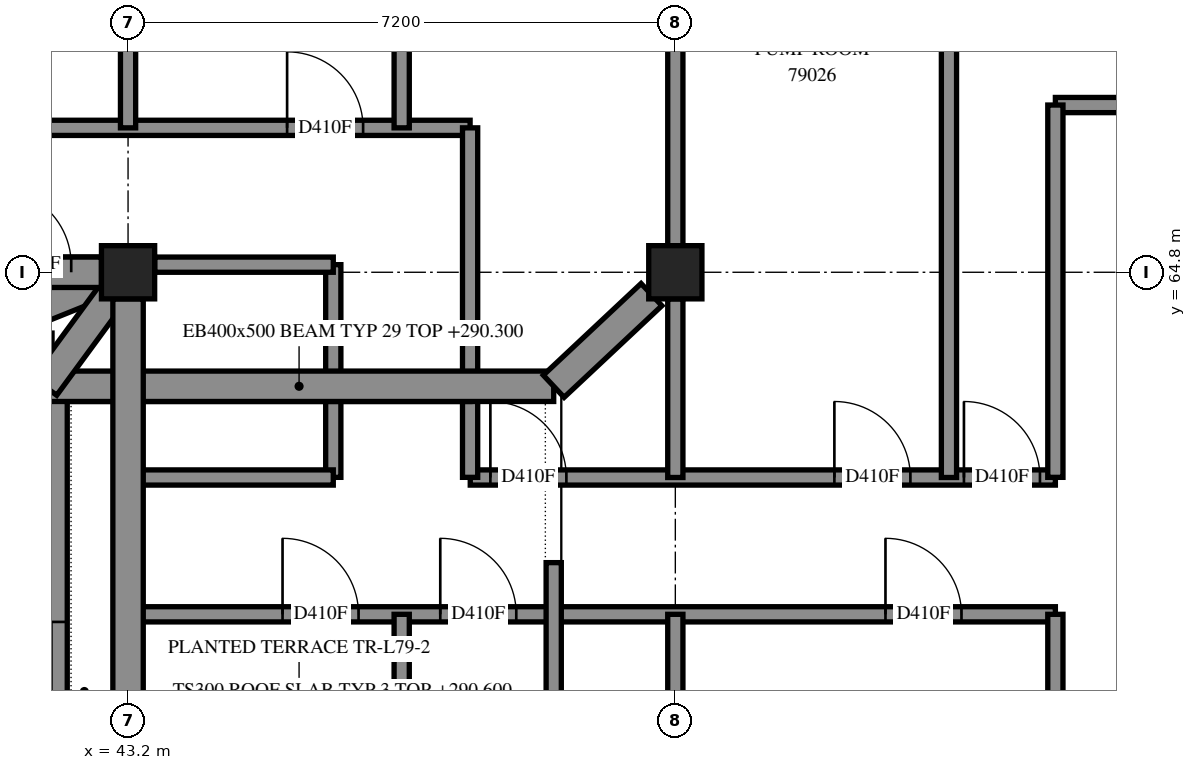
"""IFC4 building model, lengths in metres.
Left out: names, types, materials, properties, quantities, classifications, styles, units other than length and angle.
Written with IfcOpenShell. Run it as: python <this file> out.ifc"""

import sys

from ifc_helpers import new_model, si_unit, direction, frame, frame_2d, origin, origin_2d, place, context, subcontext, project, spatial, polyline, rectangle, outline, extrude, element, fill, save


model = new_model("IFC4")
c1 = context("Model", 3, precision=1e-05, world=origin(), true_north=direction((0.0, 1.0)))
c2 = subcontext(c1, "Body", "Model", "MODEL_VIEW")
j1 = project(units=[si_unit("LENGTHUNIT", "METRE"), si_unit("PLANEANGLEUNIT", "RADIAN")], contexts=[c1])
p1 = place(None, origin())
s1 = spatial("IfcSite", under=j1, at=p1, CompositionType="ELEMENT")
p2 = place(p1, origin())
s2 = spatial("IfcBuilding", under=s1, at=p2, CompositionType="ELEMENT")
p3 = place(p2, frame((0.0, 0.0, 290.6)))
s3 = spatial("IfcBuildingStorey", under=s2, at=p3, CompositionType="ELEMENT", Elevation=290.6)
for number, where, z_axis, x_axis in (
    (1, (43.2, 64.8, 0.0), (0.0, 0.0, 1.0), (1.0, 0.0, 0.0)),
    (2, (50.4, 64.8, 0.0), (0.0, 0.0, 1.0), (1.0, 0.0, 0.0)),
):
    element("IfcColumn", number, at=place(p3, frame(where, z_axis=z_axis, x_axis=x_axis)), inside=s3, PredefinedType="COLUMN", context=c2, shape_type="SweptSolid", body=[
        extrude(rectangle(XDim=0.7, YDim=0.7, at=origin_2d()), origin(), (0.0, 0.0, 1.0), 3.5),
    ])
p4 = place(p3, frame((33.767, 63.8, 0.0), z_axis=(0.0, 0.0, 1.0), x_axis=(1.0, 0.0, 0.0)))
e3 = element("IfcWall", 3, at=p4, inside=s3, PredefinedType="SOLIDWALL", context=c2, shape_type="SweptSolid", body=[
    extrude(outline(polyline([(-0.2, -0.2), (8.233, -0.2), (8.633, 0.2), (0.2, 0.2), (-0.2, -0.2)])), origin(), (0.0, 0.0, 1.0), 3.5),
])
p5 = place(p4, frame((3.283, 0.0, 0.7)))
e4 = element("IfcOpeningElement", 4, at=p5, cuts=e3, PredefinedType="OPENING", context=c2, shape_type="SweptSolid", body=[
    extrude(rectangle(XDim=1.8, YDim=2.2, at=frame_2d((0.9, 1.1))), frame((0.0, 0.21, 0.0), z_axis=(0.0, -1.0, 0.0), x_axis=(1.0, 0.0, 0.0)), (0.0, 0.0, 1.0), 0.42),
])
p6 = place(p4, frame((6.133, 0.0, 0.7)))
e5 = element("IfcOpeningElement", 5, at=p6, cuts=e3, PredefinedType="OPENING", context=c2, shape_type="SweptSolid", body=[
    extrude(rectangle(XDim=1.8, YDim=2.2, at=frame_2d((0.9, 1.1))), frame((0.0, 0.21, 0.0), z_axis=(0.0, -1.0, 0.0), x_axis=(1.0, 0.0, 0.0)), (0.0, 0.0, 1.0), 0.42),
])
p7 = place(p3, frame((42.2, 63.8, 0.0), z_axis=(0.0, 0.0, 1.0), x_axis=(0.0, -1.0, 0.0)))
e6 = element("IfcWall", 6, at=p7, inside=s3, PredefinedType="SOLIDWALL", context=c2, shape_type="SweptSolid", body=[
    extrude(outline(polyline([(0.2, -0.2), (7.4, -0.2), (7.0, 0.2), (-0.2, 0.2), (0.2, -0.2)])), origin(), (0.0, 0.0, 1.0), 3.5),
])
p8 = place(p7, frame((3.6, 0.0, 0.7)))
e7 = element("IfcOpeningElement", 7, at=p8, cuts=e6, PredefinedType="OPENING", context=c2, shape_type="SweptSolid", body=[
    extrude(rectangle(XDim=1.8, YDim=2.2, at=frame_2d((0.9, 1.1))), frame((0.0, 0.21, 0.0), z_axis=(0.0, -1.0, 0.0), x_axis=(1.0, 0.0, 0.0)), (0.0, 0.0, 1.0), 0.42),
])
p9 = place(p3, frame((55.4, 67.0, 0.0), z_axis=(0.0, 0.0, 1.0), x_axis=(1.0, 0.0, 0.0)))
e8 = element("IfcWall", 8, at=p9, inside=s3, PredefinedType="PARTITIONING", context=c2, shape_type="SweptSolid", body=[
    extrude(rectangle(XDim=18.8, YDim=0.2, at=frame_2d((9.4, 0.0))), origin(), (0.0, 0.0, 1.0), 3.5),
])
p10 = place(p9, frame((4.293, 0.0, 0.0)))
e9 = element("IfcOpeningElement", 9, at=p10, cuts=e8, PredefinedType="OPENING", context=c2, shape_type="SweptSolid", body=[
    extrude(rectangle(XDim=1.0, YDim=2.1, at=frame_2d((0.5, 1.05))), frame((0.0, 0.11, 0.0), z_axis=(0.0, -1.0, 0.0), x_axis=(1.0, 0.0, 0.0)), (0.0, 0.0, 1.0), 0.22),
])
p11 = place(p9, frame((6.367, 0.0, 0.0)))
e10 = element("IfcOpeningElement", 10, at=p11, cuts=e8, PredefinedType="OPENING", context=c2, shape_type="SweptSolid", body=[
    extrude(rectangle(XDim=1.0, YDim=2.1, at=frame_2d((0.5, 1.05))), frame((0.0, 0.11, 0.0), z_axis=(0.0, -1.0, 0.0), x_axis=(1.0, 0.0, 0.0)), (0.0, 0.0, 1.0), 0.22),
])
p12 = place(p9, frame((11.492, 0.0, 0.0)))
e11 = element("IfcOpeningElement", 11, at=p12, cuts=e8, PredefinedType="OPENING", context=c2, shape_type="SweptSolid", body=[
    extrude(rectangle(XDim=1.0, YDim=2.1, at=frame_2d((0.5, 1.05))), frame((0.0, 0.11, 0.0), z_axis=(0.0, -1.0, 0.0), x_axis=(1.0, 0.0, 0.0)), (0.0, 0.0, 1.0), 0.22),
])
p13 = place(p9, frame((13.568, 0.0, 0.0)))
e12 = element("IfcOpeningElement", 12, at=p13, cuts=e8, PredefinedType="OPENING", context=c2, shape_type="SweptSolid", body=[
    extrude(rectangle(XDim=1.0, YDim=2.1, at=frame_2d((0.5, 1.05))), frame((0.0, 0.11, 0.0), z_axis=(0.0, -1.0, 0.0), x_axis=(1.0, 0.0, 0.0)), (0.0, 0.0, 1.0), 0.22),
])
p14 = place(p3, frame((43.2, 60.3, 0.0), z_axis=(0.0, 0.0, 1.0), x_axis=(1.0, 0.0, 0.0)))
e13 = element("IfcWall", 13, at=p14, inside=s3, PredefinedType="PARTITIONING", context=c2, shape_type="SweptSolid", body=[
    extrude(rectangle(XDim=12.2, YDim=0.2, at=frame_2d((6.1, 0.0))), origin(), (0.0, 0.0, 1.0), 3.5),
])
p15 = place(p14, frame((2.033, 0.0, 0.0)))
e14 = element("IfcOpeningElement", 14, at=p15, cuts=e13, PredefinedType="OPENING", context=c2, shape_type="SweptSolid", body=[
    extrude(rectangle(XDim=1.0, YDim=2.1, at=frame_2d((0.5, 1.05))), frame((0.0, 0.11, 0.0), z_axis=(0.0, -1.0, 0.0), x_axis=(1.0, 0.0, 0.0)), (0.0, 0.0, 1.0), 0.22),
])
p16 = place(p14, frame((4.107, 0.0, 0.0)))
e15 = element("IfcOpeningElement", 15, at=p16, cuts=e13, PredefinedType="OPENING", context=c2, shape_type="SweptSolid", body=[
    extrude(rectangle(XDim=1.0, YDim=2.1, at=frame_2d((0.5, 1.05))), frame((0.0, 0.11, 0.0), z_axis=(0.0, -1.0, 0.0), x_axis=(1.0, 0.0, 0.0)), (0.0, 0.0, 1.0), 0.22),
])
p17 = place(p14, frame((9.965, 0.0, 0.0)))
e16 = element("IfcOpeningElement", 16, at=p17, cuts=e13, PredefinedType="OPENING", context=c2, shape_type="SweptSolid", body=[
    extrude(rectangle(XDim=1.0, YDim=2.1, at=frame_2d((0.5, 1.05))), frame((0.0, 0.11, 0.0), z_axis=(0.0, -1.0, 0.0), x_axis=(1.0, 0.0, 0.0)), (0.0, 0.0, 1.0), 0.22),
])
p18 = place(p3, frame((36.0, 66.7, 0.0), z_axis=(0.0, 0.0, 1.0), x_axis=(1.0, 0.0, 0.0)))
e17 = element("IfcWall", 17, at=p18, inside=s3, PredefinedType="PARTITIONING", context=c2, shape_type="SweptSolid", body=[
    extrude(rectangle(XDim=11.7, YDim=0.2, at=frame_2d((5.85, 0.0))), origin(), (0.0, 0.0, 1.0), 3.5),
])
p19 = place(p18, frame((2.092, 0.0, 0.0)))
e18 = element("IfcOpeningElement", 18, at=p19, cuts=e17, PredefinedType="OPENING", context=c2, shape_type="SweptSolid", body=[
    extrude(rectangle(XDim=1.0, YDim=2.1, at=frame_2d((0.5, 1.05))), frame((0.0, 0.11, 0.0), z_axis=(0.0, -1.0, 0.0), x_axis=(1.0, 0.0, 0.0)), (0.0, 0.0, 1.0), 0.22),
])
p20 = place(p18, frame((4.168, 0.0, 0.0)))
e19 = element("IfcOpeningElement", 19, at=p20, cuts=e17, PredefinedType="OPENING", context=c2, shape_type="SweptSolid", body=[
    extrude(rectangle(XDim=1.0, YDim=2.1, at=frame_2d((0.5, 1.05))), frame((0.0, 0.11, 0.0), z_axis=(0.0, -1.0, 0.0), x_axis=(1.0, 0.0, 0.0)), (0.0, 0.0, 1.0), 0.22),
])
p21 = place(p18, frame((9.293, 0.0, 0.0)))
e20 = element("IfcOpeningElement", 20, at=p21, cuts=e17, PredefinedType="OPENING", context=c2, shape_type="SweptSolid", body=[
    extrude(rectangle(XDim=1.0, YDim=2.1, at=frame_2d((0.5, 1.05))), frame((0.0, 0.11, 0.0), z_axis=(0.0, -1.0, 0.0), x_axis=(1.0, 0.0, 0.0)), (0.0, 0.0, 1.0), 0.22),
])
p22 = place(p3, frame((55.4, 49.6, 0.0), z_axis=(0.0, 0.0, 1.0), x_axis=(0.0, 1.0, 0.0)))
e21 = element("IfcWall", 21, at=p22, inside=s3, PredefinedType="PARTITIONING", context=c2, shape_type="SweptSolid", body=[
    extrude(rectangle(XDim=10.7, YDim=0.2, at=frame_2d((5.35, 0.0))), origin(), (0.0, 0.0, 1.0), 3.5),
])
p23 = place(p3, frame((47.702, 62.1, 0.0), z_axis=(0.0, 0.0, 1.0), x_axis=(1.0, 0.0, 0.0)))
e22 = element("IfcWall", 22, at=p23, inside=s3, PredefinedType="PARTITIONING", context=c2, shape_type="SweptSolid", body=[
    extrude(rectangle(XDim=7.698, YDim=0.2, at=frame_2d((3.849, 0.0))), origin(), (0.0, 0.0, 1.0), 3.5),
])
p24 = place(p23, frame((0.265, 0.0, 0.0)))
e23 = element("IfcOpeningElement", 23, at=p24, cuts=e22, PredefinedType="OPENING", context=c2, shape_type="SweptSolid", body=[
    extrude(rectangle(XDim=1.0, YDim=2.1, at=frame_2d((0.5, 1.05))), frame((0.0, 0.11, 0.0), z_axis=(0.0, -1.0, 0.0), x_axis=(1.0, 0.0, 0.0)), (0.0, 0.0, 1.0), 0.22),
])
p25 = place(p23, frame((4.79, 0.0, 0.0)))
e24 = element("IfcOpeningElement", 24, at=p25, cuts=e22, PredefinedType="OPENING", context=c2, shape_type="SweptSolid", body=[
    extrude(rectangle(XDim=1.0, YDim=2.1, at=frame_2d((0.5, 1.05))), frame((0.0, 0.11, 0.0), z_axis=(0.0, -1.0, 0.0), x_axis=(1.0, 0.0, 0.0)), (0.0, 0.0, 1.0), 0.22),
])
p26 = place(p23, frame((6.495, 0.0, 0.0)))
e25 = element("IfcOpeningElement", 25, at=p26, cuts=e22, PredefinedType="OPENING", context=c2, shape_type="SweptSolid", body=[
    extrude(rectangle(XDim=1.0, YDim=2.1, at=frame_2d((0.5, 1.05))), frame((0.0, 0.11, 0.0), z_axis=(0.0, -1.0, 0.0), x_axis=(1.0, 0.0, 0.0)), (0.0, 0.0, 1.0), 0.22),
])
p27 = place(p3, frame((36.35, 64.9, 0.0), z_axis=(0.0, 0.0, 1.0), x_axis=(1.0, 0.0, 0.0)))
e26 = element("IfcWall", 26, at=p27, inside=s3, PredefinedType="PARTITIONING", context=c2, shape_type="SweptSolid", body=[
    extrude(rectangle(XDim=7.2, YDim=0.2, at=frame_2d((3.6, 0.0))), origin(), (0.0, 0.0, 1.0), 3.5),
])
p28 = place(p27, frame((1.123, 0.0, 0.0)))
e27 = element("IfcOpeningElement", 27, at=p28, cuts=e26, PredefinedType="OPENING", context=c2, shape_type="SweptSolid", body=[
    extrude(rectangle(XDim=1.0, YDim=2.1, at=frame_2d((0.5, 1.05))), frame((0.0, 0.11, 0.0), z_axis=(0.0, -1.0, 0.0), x_axis=(1.0, 0.0, 0.0)), (0.0, 0.0, 1.0), 0.22),
])
p29 = place(p27, frame((5.102, 0.0, 0.0)))
e28 = element("IfcOpeningElement", 28, at=p29, cuts=e26, PredefinedType="OPENING", context=c2, shape_type="SweptSolid", body=[
    extrude(rectangle(XDim=1.0, YDim=2.1, at=frame_2d((0.5, 1.05))), frame((0.0, 0.11, 0.0), z_axis=(0.0, -1.0, 0.0), x_axis=(1.0, 0.0, 0.0)), (0.0, 0.0, 1.0), 0.22),
])
p30 = place(p3, frame((50.4, 64.45, 0.0), z_axis=(0.0, 0.0, 1.0), x_axis=(0.0, 1.0, 0.0)))
e29 = element("IfcWall", 29, at=p30, inside=s3, PredefinedType="PARTITIONING", context=c2, shape_type="SweptSolid", body=[
    extrude(rectangle(XDim=7.9, YDim=0.2, at=frame_2d((3.95, 0.0))), origin(), (0.0, 0.0, 1.0), 3.5),
])
p31 = place(p3, frame((43.2, 66.7, 0.0), z_axis=(0.0, 0.0, 1.0), x_axis=(0.0, 1.0, 0.0)))
e30 = element("IfcWall", 30, at=p31, inside=s3, PredefinedType="PARTITIONING", context=c2, shape_type="SweptSolid", body=[
    extrude(rectangle(XDim=5.65, YDim=0.2, at=frame_2d((2.825, 0.0))), origin(), (0.0, 0.0, 1.0), 3.0),
])
p32 = place(p3, frame((55.4, 62.102, 0.0), z_axis=(0.0, 0.0, 1.0), x_axis=(0.0, 1.0, 0.0)))
e31 = element("IfcWall", 31, at=p32, inside=s3, PredefinedType="PARTITIONING", context=c2, shape_type="SweptSolid", body=[
    extrude(rectangle(XDim=4.898, YDim=0.2, at=frame_2d((2.449, 0.0))), origin(), (0.0, 0.0, 1.0), 3.5),
])
p33 = place(p3, frame((47.7, 62.102, 0.0), z_axis=(0.0, 0.0, 1.0), x_axis=(0.0, 1.0, 0.0)))
e32 = element("IfcWall", 32, at=p33, inside=s3, PredefinedType="PARTITIONING", context=c2, shape_type="SweptSolid", body=[
    extrude(rectangle(XDim=4.598, YDim=0.2, at=frame_2d((2.299, 0.0))), origin(), (0.0, 0.0, 1.0), 3.0),
])
p34 = place(p3, frame((45.9, 62.102, 0.0), z_axis=(0.0, 0.0, 1.0), x_axis=(0.0, 1.0, 0.0)))
e33 = element("IfcWall", 33, at=p34, inside=s3, PredefinedType="PARTITIONING", context=c2, shape_type="SweptSolid", body=[
    extrude(rectangle(XDim=2.798, YDim=0.2, at=frame_2d((1.399, 0.0))), origin(), (0.0, 0.0, 1.0), 3.5),
])
p35 = place(p3, frame((43.202, 62.1, 0.0), z_axis=(0.0, 0.0, 1.0), x_axis=(1.0, 0.0, 0.0)))
e34 = element("IfcWall", 34, at=p35, inside=s3, PredefinedType="PARTITIONING", context=c2, shape_type="SweptSolid", body=[
    extrude(rectangle(XDim=2.698, YDim=0.2, at=frame_2d((1.349, 0.0))), origin(), (0.0, 0.0, 1.0), 3.5),
])
for number, where, z_axis, x_axis in (
    (35, (43.55, 64.9, 0.0), (0.0, 0.0, 1.0), (1.0, 0.0, 0.0)),
    (36, (50.4, 62.1, 0.0), (0.0, 0.0, 1.0), (0.0, 1.0, 0.0)),
):
    element("IfcWall", number, at=place(p3, frame(where, z_axis=z_axis, x_axis=x_axis)), inside=s3, PredefinedType="PARTITIONING", context=c2, shape_type="SweptSolid", body=[
        extrude(rectangle(XDim=2.35, YDim=0.2, at=frame_2d((1.175, 0.0))), origin(), (0.0, 0.0, 1.0), 3.0),
    ])
p36 = place(p3, frame((43.2, 57.25, 0.0), z_axis=(0.0, 0.0, 1.0), x_axis=(0.0, 1.0, 0.0)))
e37 = element("IfcWall", 37, at=p36, inside=s3, PredefinedType="PARTITIONING", context=c2, shape_type="SweptSolid", body=[
    extrude(rectangle(XDim=3.05, YDim=0.2, at=frame_2d((1.525, 0.0))), origin(), (0.0, 0.0, 1.0), 3.5),
])
p37 = place(p3, frame((50.4, 57.95, 0.0), z_axis=(0.0, 0.0, 1.0), x_axis=(0.0, 1.0, 0.0)))
e38 = element("IfcWall", 38, at=p37, inside=s3, PredefinedType="PARTITIONING", context=c2, shape_type="SweptSolid", body=[
    extrude(rectangle(XDim=2.35, YDim=0.2, at=frame_2d((1.175, 0.0))), origin(), (0.0, 0.0, 1.0), 3.0),
])
p38 = place(p3, frame((43.2, 60.3, 0.0), z_axis=(0.0, 0.0, 1.0), x_axis=(0.0, 1.0, 0.0)))
e39 = element("IfcWall", 39, at=p38, inside=s3, PredefinedType="PARTITIONING", context=c2, shape_type="SweptSolid", body=[
    extrude(rectangle(XDim=1.8, YDim=0.2, at=frame_2d((0.9, 0.0))), origin(), (0.0, 0.0, 1.0), 3.5),
])
p39 = place(p3, frame((48.8, 56.8, 0.0), z_axis=(0.0, 0.0, 1.0), x_axis=(0.0, 1.0, 0.0)))
e40 = element("IfcWall", 40, at=p39, inside=s3, PredefinedType="PARAPET", context=c2, shape_type="SweptSolid", body=[
    extrude(outline(polyline([(0.0, -0.1), (4.18, -0.1), (4.18, 0.1), (0.0, 0.1), (0.0, -0.1)])), origin(), (0.0, 0.0, 1.0), 0.25),
])
p40 = place(p3, frame((47.697, 63.2, 0.0), z_axis=(0.0, 0.0, 1.0), x_axis=(-1.0, 0.0, 0.0)))
e41 = element("IfcWall", 41, at=p40, inside=s3, PredefinedType="PARAPET", context=c2, shape_type="SweptSolid", body=[
    extrude(outline(polyline([(0.0, -0.1), (5.297, -0.1), (5.297, 0.1), (0.0, 0.1), (0.0, -0.1)])), origin(), (0.0, 0.0, 1.0), 0.25),
])
p41 = place(p3, frame((54.0, 62.1, 0.0), z_axis=(0.0, 0.0, 1.0), x_axis=(0.0, 1.0, 0.0)))
e42 = element("IfcWall", 42, at=p41, inside=s3, PredefinedType="PARTITIONING", context=c2, shape_type="SweptSolid", body=[
    extrude(outline(polyline([(0.0, -0.1), (10.7, -0.1), (10.7, 0.1), (0.0, 0.1), (0.0, -0.1)])), origin(), (0.0, 0.0, 1.0), 3.5),
])
p42 = place(p3, frame((46.8, 66.7, 0.0), z_axis=(0.0, 0.0, 1.0), x_axis=(0.0, 1.0, 0.0)))
e43 = element("IfcWall", 43, at=p42, inside=s3, PredefinedType="PARTITIONING", context=c2, shape_type="SweptSolid", body=[
    extrude(outline(polyline([(0.0, -0.1), (6.1, -0.1), (6.1, 0.1), (0.0, 0.1), (0.0, -0.1)])), origin(), (0.0, 0.0, 1.0), 3.5),
])
p43 = place(p3, frame((46.8, 56.8, 0.0), z_axis=(0.0, 0.0, 1.0), x_axis=(0.0, 1.0, 0.0)))
e44 = element("IfcWall", 44, at=p43, inside=s3, PredefinedType="PARTITIONING", context=c2, shape_type="SweptSolid", body=[
    extrude(outline(polyline([(0.0, -0.1), (3.5, -0.1), (3.5, 0.1), (0.0, 0.1), (0.0, -0.1)])), origin(), (0.0, 0.0, 1.0), 3.5),
])
p44 = place(p8, origin())
e45 = element("IfcWindow", 45, at=p44, inside=s3, PartitioningType="SINGLE_PANEL", PredefinedType="WINDOW", context=c2, shape_type="SweptSolid", body=[
    extrude(rectangle(XDim=1.8, YDim=2.2, at=frame_2d((0.9, 1.1))), frame((0.0, 0.08, 0.0), z_axis=(0.0, -1.0, 0.0), x_axis=(1.0, 0.0, 0.0)), (0.0, 0.0, 1.0), 0.06),
])
fill(e7, e45)
p45 = place(p21, origin())
e46 = element("IfcDoor", 46, at=p45, inside=s3, OperationType="SINGLE_SWING_RIGHT", PredefinedType="DOOR", context=c2, shape_type="SweptSolid", body=[
    extrude(rectangle(XDim=1.0, YDim=2.1, at=frame_2d((0.5, 1.05))), frame((0.0, 0.025, 0.0), z_axis=(0.0, -1.0, 0.0), x_axis=(1.0, 0.0, 0.0)), (0.0, 0.0, 1.0), 0.05),
])
fill(e20, e46)
p46 = place(p29, origin())
e47 = element("IfcDoor", 47, at=p46, inside=s3, OperationType="SINGLE_SWING_RIGHT", PredefinedType="DOOR", context=c2, shape_type="SweptSolid", body=[
    extrude(rectangle(XDim=1.0, YDim=2.1, at=frame_2d((0.5, 1.05))), frame((0.0, 0.025, 0.0), z_axis=(0.0, -1.0, 0.0), x_axis=(1.0, 0.0, 0.0)), (0.0, 0.0, 1.0), 0.05),
])
fill(e28, e47)
p47 = place(p15, origin())
e48 = element("IfcDoor", 48, at=p47, inside=s3, OperationType="SINGLE_SWING_LEFT", PredefinedType="DOOR", context=c2, shape_type="SweptSolid", body=[
    extrude(rectangle(XDim=1.0, YDim=2.1, at=frame_2d((0.5, 1.05))), frame((0.0, 0.025, 0.0), z_axis=(0.0, -1.0, 0.0), x_axis=(1.0, 0.0, 0.0)), (0.0, 0.0, 1.0), 0.05),
])
fill(e14, e48)
p48 = place(p24, origin())
e49 = element("IfcDoor", 49, at=p48, inside=s3, OperationType="SINGLE_SWING_LEFT", PredefinedType="DOOR", context=c2, shape_type="SweptSolid", body=[
    extrude(rectangle(XDim=1.0, YDim=2.1, at=frame_2d((0.5, 1.05))), frame((0.0, 0.025, 0.0), z_axis=(0.0, -1.0, 0.0), x_axis=(1.0, 0.0, 0.0)), (0.0, 0.0, 1.0), 0.05),
])
fill(e23, e49)
p49 = place(p25, origin())
e50 = element("IfcDoor", 50, at=p49, inside=s3, OperationType="SINGLE_SWING_RIGHT", PredefinedType="DOOR", context=c2, shape_type="SweptSolid", body=[
    extrude(rectangle(XDim=1.0, YDim=2.1, at=frame_2d((0.5, 1.05))), frame((0.0, 0.025, 0.0), z_axis=(0.0, -1.0, 0.0), x_axis=(1.0, 0.0, 0.0)), (0.0, 0.0, 1.0), 0.05),
])
fill(e24, e50)
p50 = place(p26, origin())
e51 = element("IfcDoor", 51, at=p50, inside=s3, OperationType="SINGLE_SWING_LEFT", PredefinedType="DOOR", context=c2, shape_type="SweptSolid", body=[
    extrude(rectangle(XDim=1.0, YDim=2.1, at=frame_2d((0.5, 1.05))), frame((0.0, 0.025, 0.0), z_axis=(0.0, -1.0, 0.0), x_axis=(1.0, 0.0, 0.0)), (0.0, 0.0, 1.0), 0.05),
])
fill(e25, e51)
p51 = place(p16, origin())
e52 = element("IfcDoor", 52, at=p51, inside=s3, OperationType="SINGLE_SWING_RIGHT", PredefinedType="DOOR", context=c2, shape_type="SweptSolid", body=[
    extrude(rectangle(XDim=1.0, YDim=2.1, at=frame_2d((0.5, 1.05))), frame((0.0, 0.025, 0.0), z_axis=(0.0, -1.0, 0.0), x_axis=(1.0, 0.0, 0.0)), (0.0, 0.0, 1.0), 0.05),
])
fill(e15, e52)
p52 = place(p17, origin())
e53 = element("IfcDoor", 53, at=p52, inside=s3, OperationType="SINGLE_SWING_LEFT", PredefinedType="DOOR", context=c2, shape_type="SweptSolid", body=[
    extrude(rectangle(XDim=1.0, YDim=2.1, at=frame_2d((0.5, 1.05))), frame((0.0, 0.025, 0.0), z_axis=(0.0, -1.0, 0.0), x_axis=(1.0, 0.0, 0.0)), (0.0, 0.0, 1.0), 0.05),
])
fill(e16, e53)
save(model, sys.argv[1])
